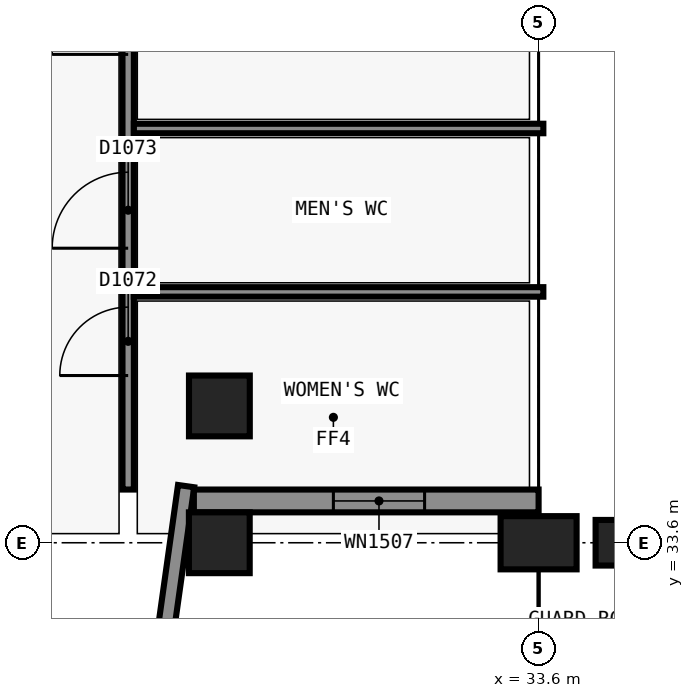
"""IFC4 building model, lengths in metres.
Left out: names, types, materials, properties, quantities, classifications, styles, units other than length and angle.
Written with IfcOpenShell. Run it as: python <this file> out.ifc"""

import sys

from ifc_helpers import new_model, si_unit, direction, frame, frame_2d, origin, origin_2d, place, context, subcontext, project, spatial, rectangle, extrude, element, fill, save


model = new_model("IFC4")
c1 = context("Model", 3, precision=1e-05, world=origin(), true_north=direction((0.0, 1.0)))
c2 = subcontext(c1, "Body", "Model", "MODEL_VIEW")
j1 = project(units=[si_unit("LENGTHUNIT", "METRE"), si_unit("PLANEANGLEUNIT", "RADIAN")], contexts=[c1])
p1 = place(None, origin())
s1 = spatial("IfcSite", under=j1, at=p1, CompositionType="ELEMENT")
p2 = place(p1, origin())
s2 = spatial("IfcBuilding", under=s1, at=p2, CompositionType="ELEMENT")
p3 = place(p2, frame((0.0, 0.0, 5.4)))
s3 = spatial("IfcBuildingStorey", under=s2, at=p3, CompositionType="ELEMENT", Elevation=5.4)
p4 = place(p3, frame((33.6, 33.6, 0.0), z_axis=(0.0, 0.0, 1.0), x_axis=(1.0, 0.0, 0.0)))
e1 = element("IfcColumn", 1, at=p4, inside=s3, PredefinedType="COLUMN", context=c2, shape_type="SweptSolid", body=[
    extrude(rectangle(XDim=1.0, YDim=0.7, at=origin_2d()), origin(), (0.0, 0.0, 1.0), 4.8),
])
p5 = place(p3, frame((34.65, 33.6, 0.0), z_axis=(0.0, 0.0, 1.0), x_axis=(1.0, 0.0, 0.0)))
e2 = element("IfcColumn", 2, at=p5, inside=s3, PredefinedType="COLUMN", context=c2, shape_type="SweptSolid", body=[
    extrude(rectangle(XDim=0.6, YDim=0.6, at=origin_2d()), origin(), (0.0, 0.0, 1.0), 4.8),
])
for number, where, z_axis, x_axis in (
    (3, (29.399, 33.6, 0.0), (0.0, 0.0, 1.0), (1.0, 0.0, 0.0)),
    (4, (29.4, 35.4, 0.0), (0.0, 0.0, 1.0), (1.0, 0.0, 0.0)),
):
    element("IfcColumn", number, at=place(p3, frame(where, z_axis=z_axis, x_axis=x_axis)), inside=s3, PredefinedType="COLUMN", context=c2, shape_type="SweptSolid", body=[
        extrude(rectangle(XDim=0.8, YDim=0.8, at=origin_2d()), origin(), (0.0, 0.0, 1.0), 4.8),
    ])
p6 = place(p3, frame((28.962, 34.345, 0.0), z_axis=(0.0, 0.0, 1.0), x_axis=(-0.139230687381, -0.99025997379, 0.0)))
e5 = element("IfcWall", 5, at=p6, inside=s3, PredefinedType="SOLIDWALL", context=c2, shape_type="SweptSolid", body=[
    extrude(rectangle(XDim=2.169, YDim=0.215, at=frame_2d((1.084, 0.0))), origin(), (0.0, 0.0, 1.0), 4.5),
])
p7 = place(p3, frame((33.6, 34.15, 0.0), z_axis=(0.0, 0.0, 1.0), x_axis=(-1.0, 0.0, 0.0)))
e6 = element("IfcWall", 6, at=p7, inside=s3, PredefinedType="SOLIDWALL", context=c2, shape_type="SweptSolid", body=[
    extrude(rectangle(XDim=4.536, YDim=0.3, at=frame_2d((2.268, 0.0))), origin(), (0.0, 0.0, 1.0), 4.5),
])
p8 = place(p7, frame((1.5, 0.0, 1.5)))
e7 = element("IfcOpeningElement", 7, at=p8, cuts=e6, PredefinedType="OPENING", context=c2, shape_type="SweptSolid", body=[
    extrude(rectangle(XDim=1.2, YDim=0.9, at=frame_2d((0.6, 0.45))), frame((0.0, 0.16, 0.0), z_axis=(0.0, -1.0, 0.0), x_axis=(1.0, 0.0, 0.0)), (0.0, 0.0, 1.0), 0.32),
])
p9 = place(p3, frame((28.2, 34.3, 0.0), z_axis=(0.0, 0.0, 1.0), x_axis=(0.0, 1.0, 0.0)))
e8 = element("IfcWall", 8, at=p9, inside=s3, PredefinedType="PARTITIONING", context=c2, shape_type="SweptSolid", body=[
    extrude(rectangle(XDim=7.5, YDim=0.15, at=frame_2d((3.75, 0.0))), origin(), (0.0, 0.0, 1.0), 4.5),
])
p10 = place(p9, frame((1.5, 0.0, 0.0)))
e9 = element("IfcOpeningElement", 9, at=p10, cuts=e8, PredefinedType="OPENING", context=c2, shape_type="SweptSolid", body=[
    extrude(rectangle(XDim=0.9, YDim=2.1, at=frame_2d((0.45, 1.05))), frame((0.0, 0.085, 0.0), z_axis=(0.0, -1.0, 0.0), x_axis=(1.0, 0.0, 0.0)), (0.0, 0.0, 1.0), 0.17),
])
p11 = place(p9, frame((3.175, 0.0, 0.0)))
e10 = element("IfcOpeningElement", 10, at=p11, cuts=e8, PredefinedType="OPENING", context=c2, shape_type="SweptSolid", body=[
    extrude(rectangle(XDim=1.0, YDim=2.1, at=frame_2d((0.5, 1.05))), frame((0.0, 0.085, 0.0), z_axis=(0.0, -1.0, 0.0), x_axis=(1.0, 0.0, 0.0)), (0.0, 0.0, 1.0), 0.17),
])
p12 = place(p9, frame((5.725, 0.0, 0.0)))
e11 = element("IfcOpeningElement", 11, at=p12, cuts=e8, PredefinedType="OPENING", context=c2, shape_type="SweptSolid", body=[
    extrude(rectangle(XDim=1.0, YDim=2.1, at=frame_2d((0.5, 1.05))), frame((0.0, 0.085, 0.0), z_axis=(0.0, -1.0, 0.0), x_axis=(1.0, 0.0, 0.0)), (0.0, 0.0, 1.0), 0.17),
])
for number, where, z_axis, x_axis in (
    (12, (28.275, 36.9, 0.0), (0.0, 0.0, 1.0), (1.0, 0.0, 0.0)),
    (13, (28.275, 39.05, 0.0), (0.0, 0.0, 1.0), (1.0, 0.0, 0.0)),
):
    element("IfcWall", number, at=place(p3, frame(where, z_axis=z_axis, x_axis=x_axis)), inside=s3, PredefinedType="PARTITIONING", context=c2, shape_type="SweptSolid", body=[
        extrude(rectangle(XDim=5.388, YDim=0.125, at=frame_2d((2.694, 0.0))), origin(), (0.0, 0.0, 1.0), 3.8),
    ])
p13 = place(p8, origin())
e14 = element("IfcWindow", 14, at=p13, inside=s3, PartitioningType="SINGLE_PANEL", PredefinedType="WINDOW", context=c2, shape_type="SweptSolid", body=[
    extrude(rectangle(XDim=1.2, YDim=0.9, at=frame_2d((0.6, 0.45))), frame((0.0, 0.03, 0.0), z_axis=(0.0, -1.0, 0.0), x_axis=(1.0, 0.0, 0.0)), (0.0, 0.0, 1.0), 0.06),
])
fill(e7, e14)
p14 = place(p10, origin())
e15 = element("IfcDoor", 15, at=p14, inside=s3, OperationType="SINGLE_SWING_RIGHT", PredefinedType="DOOR", context=c2, shape_type="SweptSolid", body=[
    extrude(rectangle(XDim=0.9, YDim=2.1, at=frame_2d((0.45, 1.05))), frame((0.0, 0.025, 0.0), z_axis=(0.0, -1.0, 0.0), x_axis=(1.0, 0.0, 0.0)), (0.0, 0.0, 1.0), 0.05),
])
fill(e9, e15)
p15 = place(p11, origin())
e16 = element("IfcDoor", 16, at=p15, inside=s3, OperationType="SINGLE_SWING_LEFT", PredefinedType="DOOR", context=c2, shape_type="SweptSolid", body=[
    extrude(rectangle(XDim=1.0, YDim=2.1, at=frame_2d((0.5, 1.05))), frame((0.0, 0.025, 0.0), z_axis=(0.0, -1.0, 0.0), x_axis=(1.0, 0.0, 0.0)), (0.0, 0.0, 1.0), 0.05),
])
fill(e10, e16)
p16 = place(p12, origin())
e17 = element("IfcDoor", 17, at=p16, inside=s3, OperationType="SINGLE_SWING_RIGHT", PredefinedType="DOOR", context=c2, shape_type="SweptSolid", body=[
    extrude(rectangle(XDim=1.0, YDim=2.1, at=frame_2d((0.5, 1.05))), frame((0.0, 0.025, 0.0), z_axis=(0.0, -1.0, 0.0), x_axis=(1.0, 0.0, 0.0)), (0.0, 0.0, 1.0), 0.05),
])
fill(e11, e17)
save(model, sys.argv[1])
